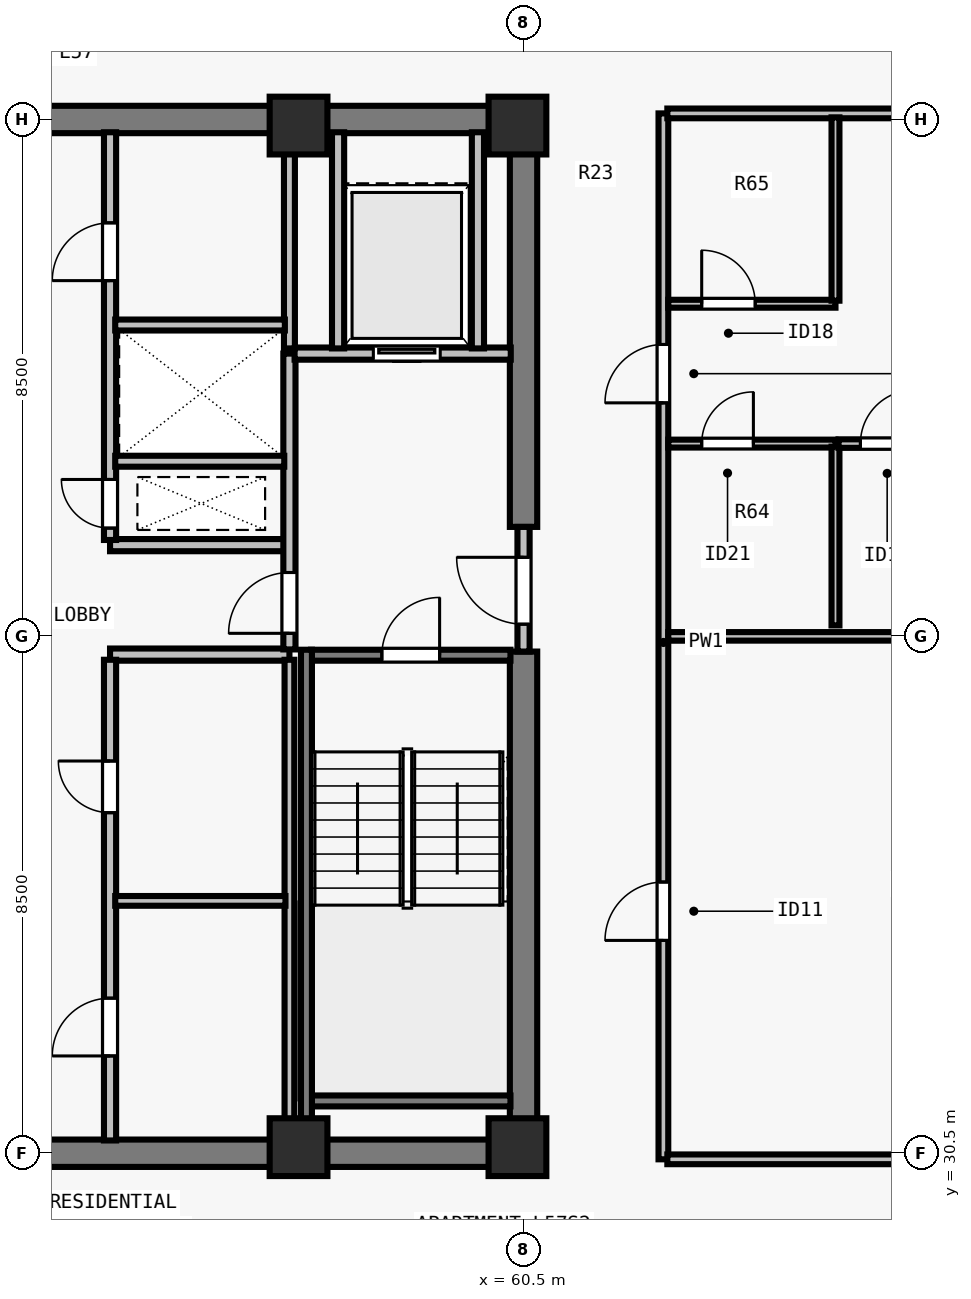
"""IFC4 building model, lengths in metres.
Left out: names, types, materials, properties, quantities, classifications, styles, units other than length and angle.
Written with IfcOpenShell. Run it as: python <this file> out.ifc"""

import sys

from ifc_helpers import new_model, si_unit, direction, frame, frame_2d, origin, origin_2d, place, context, subcontext, project, spatial, rectangle, extrude, element, fill, save


model = new_model("IFC4")
c1 = context("Model", 3, precision=1e-05, world=origin(), true_north=direction((0.0, 1.0)))
c2 = subcontext(c1, "Body", "Model", "MODEL_VIEW")
j1 = project(units=[si_unit("LENGTHUNIT", "METRE"), si_unit("PLANEANGLEUNIT", "RADIAN")], contexts=[c1])
p1 = place(None, origin())
s1 = spatial("IfcSite", under=j1, at=p1, CompositionType="ELEMENT")
p2 = place(p1, origin())
s2 = spatial("IfcBuilding", under=s1, at=p2, CompositionType="ELEMENT")
p3 = place(p2, frame((0.0, 0.0, 209.5)))
s3 = spatial("IfcBuildingStorey", under=s2, at=p3, CompositionType="ELEMENT", Elevation=209.5)
for number, where, z_axis, x_axis in (
    (1, (56.8, 30.6, 0.0), (0.0, 0.0, 1.0), (1.0, 0.0, 0.0)),
    (2, (60.4, 30.6, 0.0), (0.0, 0.0, 1.0), (1.0, 0.0, 0.0)),
    (3, (56.8, 47.4, 0.0), (0.0, 0.0, 1.0), (1.0, 0.0, 0.0)),
    (4, (60.4, 47.4, 0.0), (0.0, 0.0, 1.0), (1.0, 0.0, 0.0)),
):
    element("IfcColumn", number, at=place(p3, frame(where, z_axis=z_axis, x_axis=x_axis)), inside=s3, PredefinedType="COLUMN", context=c2, shape_type="SweptSolid", body=[
        extrude(rectangle(XDim=0.95, YDim=0.95, at=origin_2d()), origin(), (0.0, 0.0, 1.0), 3.5),
    ])
for number, where, z_axis, x_axis in (
    (5, (43.275, 30.5, 0.0), (0.0, 0.0, 1.0), (1.0, 0.0, 0.0)),
    (6, (43.275, 47.5, 0.0), (0.0, 0.0, 1.0), (1.0, 0.0, 0.0)),
):
    element("IfcWall", number, at=place(p3, frame(where, z_axis=z_axis, x_axis=x_axis)), inside=s3, PredefinedType="SHEAR", context=c2, shape_type="SweptSolid", body=[
        extrude(rectangle(XDim=17.45, YDim=0.45, at=frame_2d((8.725, 0.0))), origin(), (0.0, 0.0, 1.0), 3.29),
    ])
p4 = place(p3, frame((60.5, 30.715, 0.0), z_axis=(0.0, 0.0, 1.0), x_axis=(0.0, 1.0, 0.0)))
e7 = element("IfcWall", 7, at=p4, inside=s3, PredefinedType="SHEAR", context=c2, shape_type="SweptSolid", body=[
    extrude(rectangle(XDim=8.035, YDim=0.45, at=frame_2d((4.018, 0.0))), origin(), (0.0, 0.0, 1.0), 3.29),
])
p5 = place(p3, frame((60.5, 40.8, 0.0), z_axis=(0.0, 0.0, 1.0), x_axis=(0.0, 1.0, 0.0)))
e8 = element("IfcWall", 8, at=p5, inside=s3, PredefinedType="SHEAR", context=c2, shape_type="SweptSolid", body=[
    extrude(rectangle(XDim=6.485, YDim=0.45, at=frame_2d((3.242, 0.0))), origin(), (0.0, 0.0, 1.0), 3.29),
])
for number, where, z_axis, x_axis in (
    (9, (53.7, 38.7, 0.0), (0.0, 0.0, 1.0), (1.0, 0.0, 0.0)),
    (10, (53.7, 40.5, 0.0), (0.0, 0.0, 1.0), (1.0, 0.0, 0.0)),
):
    element("IfcWall", number, at=place(p3, frame(where, z_axis=z_axis, x_axis=x_axis)), inside=s3, PredefinedType="SOLIDWALL", context=c2, shape_type="SweptSolid", body=[
        extrude(rectangle(XDim=2.95, YDim=0.2, at=frame_2d((1.475, 0.0))), origin(), (0.0, 0.0, 1.0), 3.29),
    ])
p6 = place(p3, frame((53.7, 30.71, 0.0), z_axis=(0.0, 0.0, 1.0), x_axis=(0.0, 1.0, 0.0)))
e11 = element("IfcWall", 11, at=p6, inside=s3, PredefinedType="SOLIDWALL", context=c2, shape_type="SweptSolid", body=[
    extrude(rectangle(XDim=7.905, YDim=0.2, at=frame_2d((3.953, 0.0))), origin(), (0.0, 0.0, 1.0), 3.29),
])
p7 = place(p6, frame((1.39, 0.0, 0.0)))
e12 = element("IfcOpeningElement", 12, at=p7, cuts=e11, PredefinedType="OPENING", context=c2, shape_type="SweptSolid", body=[
    extrude(rectangle(XDim=0.95, YDim=2.12, at=frame_2d((0.475, 1.06))), frame((0.0, 0.11, 0.0), z_axis=(0.0, -1.0, 0.0), x_axis=(1.0, 0.0, 0.0)), (0.0, 0.0, 1.0), 0.22),
])
p8 = place(p6, frame((5.39, 0.0, 0.0)))
e13 = element("IfcOpeningElement", 13, at=p8, cuts=e11, PredefinedType="OPENING", context=c2, shape_type="SweptSolid", body=[
    extrude(rectangle(XDim=0.85, YDim=2.12, at=frame_2d((0.425, 1.06))), frame((0.0, 0.11, 0.0), z_axis=(0.0, -1.0, 0.0), x_axis=(1.0, 0.0, 0.0)), (0.0, 0.0, 1.0), 0.22),
])
p9 = place(p3, frame((53.7, 40.585, 0.0), z_axis=(0.0, 0.0, 1.0), x_axis=(0.0, 1.0, 0.0)))
e14 = element("IfcWall", 14, at=p9, inside=s3, PredefinedType="SOLIDWALL", context=c2, shape_type="SweptSolid", body=[
    extrude(rectangle(XDim=6.705, YDim=0.2, at=frame_2d((3.353, 0.0))), origin(), (0.0, 0.0, 1.0), 3.29),
])
p10 = place(p9, frame((0.195, 0.0, 0.0)))
e15 = element("IfcOpeningElement", 15, at=p10, cuts=e14, PredefinedType="OPENING", context=c2, shape_type="SweptSolid", body=[
    extrude(rectangle(XDim=0.8, YDim=2.08, at=frame_2d((0.4, 1.04))), frame((0.0, 0.11, 0.0), z_axis=(0.0, -1.0, 0.0), x_axis=(1.0, 0.0, 0.0)), (0.0, 0.0, 1.0), 0.22),
])
p11 = place(p9, frame((4.265, 0.0, 0.0)))
e16 = element("IfcOpeningElement", 16, at=p11, cuts=e14, PredefinedType="OPENING", context=c2, shape_type="SweptSolid", body=[
    extrude(rectangle(XDim=0.95, YDim=2.12, at=frame_2d((0.475, 1.06))), frame((0.0, 0.11, 0.0), z_axis=(0.0, -1.0, 0.0), x_axis=(1.0, 0.0, 0.0)), (0.0, 0.0, 1.0), 0.22),
])
p12 = place(p3, frame((60.5, 38.75, 0.0), z_axis=(0.0, 0.0, 1.0), x_axis=(0.0, 1.0, 0.0)))
e17 = element("IfcWall", 17, at=p12, inside=s3, PredefinedType="SOLIDWALL", context=c2, shape_type="SweptSolid", body=[
    extrude(rectangle(XDim=2.05, YDim=0.2, at=frame_2d((1.025, 0.0))), origin(), (0.0, 0.0, 1.0), 3.29),
])
p13 = place(p12, frame((0.45, 0.0, 0.0)))
e18 = element("IfcOpeningElement", 18, at=p13, cuts=e17, PredefinedType="OPENING", context=c2, shape_type="SweptSolid", body=[
    extrude(rectangle(XDim=1.1, YDim=2.15, at=frame_2d((0.55, 1.075))), frame((0.0, 0.11, 0.0), z_axis=(0.0, -1.0, 0.0), x_axis=(1.0, 0.0, 0.0)), (0.0, 0.0, 1.0), 0.22),
])
p14 = place(p3, frame((56.65, 38.785, 0.0), z_axis=(0.0, 0.0, 1.0), x_axis=(0.0, 1.0, 0.0)))
e19 = element("IfcWall", 19, at=p14, inside=s3, PredefinedType="SOLIDWALL", context=c2, shape_type="SweptSolid", body=[
    extrude(rectangle(XDim=4.865, YDim=0.2, at=frame_2d((2.433, 0.0))), origin(), (0.0, 0.0, 1.0), 3.29),
])
p15 = place(p14, frame((0.265, 0.0, 0.0)))
e20 = element("IfcOpeningElement", 20, at=p15, cuts=e19, PredefinedType="OPENING", context=c2, shape_type="SweptSolid", body=[
    extrude(rectangle(XDim=1.0, YDim=2.15, at=frame_2d((0.5, 1.075))), frame((0.0, 0.11, 0.0), z_axis=(0.0, -1.0, 0.0), x_axis=(1.0, 0.0, 0.0)), (0.0, 0.0, 1.0), 0.22),
])
p16 = place(p3, frame((56.735, 43.65, 0.0), z_axis=(0.0, 0.0, 1.0), x_axis=(1.0, 0.0, 0.0)))
e21 = element("IfcWall", 21, at=p16, inside=s3, PredefinedType="SOLIDWALL", context=c2, shape_type="SweptSolid", body=[
    extrude(rectangle(XDim=3.555, YDim=0.2, at=frame_2d((1.777, 0.0))), origin(), (0.0, 0.0, 1.0), 3.29),
])
p17 = place(p16, frame((1.295, 0.0, 0.0)))
e22 = element("IfcOpeningElement", 22, at=p17, cuts=e21, PredefinedType="OPENING", context=c2, shape_type="SweptSolid", body=[
    extrude(rectangle(XDim=1.1, YDim=2.2, at=frame_2d((0.55, 1.1))), frame((0.0, 0.11, 0.0), z_axis=(0.0, -1.0, 0.0), x_axis=(1.0, 0.0, 0.0)), (0.0, 0.0, 1.0), 0.22),
])
for number, where, z_axis, x_axis in (
    (23, (57.45, 43.735, 0.0), (0.0, 0.0, 1.0), (0.0, 1.0, 0.0)),
    (24, (59.75, 43.735, 0.0), (0.0, 0.0, 1.0), (0.0, 1.0, 0.0)),
):
    element("IfcWall", number, at=place(p3, frame(where, z_axis=z_axis, x_axis=x_axis)), inside=s3, PredefinedType="SOLIDWALL", context=c2, shape_type="SweptSolid", body=[
        extrude(rectangle(XDim=3.555, YDim=0.2, at=frame_2d((1.777, 0.0))), origin(), (0.0, 0.0, 1.0), 3.29),
    ])
p18 = place(p3, frame((56.65, 30.71, 0.0), z_axis=(0.0, 0.0, 1.0), x_axis=(0.0, 1.0, 0.0)))
e25 = element("IfcWall", 25, at=p18, inside=s3, PredefinedType="PARTITIONING", context=c2, shape_type="SweptSolid", body=[
    extrude(rectangle(XDim=7.905, YDim=0.16, at=frame_2d((3.953, 0.0))), origin(), (0.0, 0.0, 1.0), 3.29),
])
p19 = place(p3, frame((53.785, 34.65, 0.0), z_axis=(0.0, 0.0, 1.0), x_axis=(1.0, 0.0, 0.0)))
e26 = element("IfcWall", 26, at=p19, inside=s3, PredefinedType="PARTITIONING", context=c2, shape_type="SweptSolid", body=[
    extrude(rectangle(XDim=2.8, YDim=0.16, at=frame_2d((1.4, 0.0))), origin(), (0.0, 0.0, 1.0), 3.29),
])
p20 = place(p3, frame((56.65, 43.735, 0.0), z_axis=(0.0, 0.0, 1.0), x_axis=(0.0, 1.0, 0.0)))
e27 = element("IfcWall", 27, at=p20, inside=s3, PredefinedType="SOLIDWALL", context=c2, shape_type="SweptSolid", body=[
    extrude(rectangle(XDim=3.555, YDim=0.18, at=frame_2d((1.777, 0.0))), origin(), (0.0, 0.0, 1.0), 3.29),
])
p21 = place(p3, frame((53.785, 41.88, 0.0), z_axis=(0.0, 0.0, 1.0), x_axis=(1.0, 0.0, 0.0)))
e28 = element("IfcWall", 28, at=p21, inside=s3, PredefinedType="SOLIDWALL", context=c2, shape_type="SweptSolid", body=[
    extrude(rectangle(XDim=2.78, YDim=0.18, at=frame_2d((1.39, 0.0))), origin(), (0.0, 0.0, 1.0), 3.29),
])
p22 = place(p3, frame((53.785, 44.12, 0.0), z_axis=(0.0, 0.0, 1.0), x_axis=(1.0, 0.0, 0.0)))
e29 = element("IfcWall", 29, at=p22, inside=s3, PredefinedType="SOLIDWALL", context=c2, shape_type="SweptSolid", body=[
    extrude(rectangle(XDim=2.79, YDim=0.18, at=frame_2d((1.395, 0.0))), origin(), (0.0, 0.0, 1.0), 3.29),
])
p23 = place(p3, frame((62.8, 30.4, 0.0), z_axis=(0.0, 0.0, 1.0), x_axis=(0.0, 1.0, 0.0)))
e30 = element("IfcWall", 30, at=p23, inside=s3, PredefinedType="PARTITIONING", context=c2, shape_type="SweptSolid", body=[
    extrude(rectangle(XDim=17.2, YDim=0.16, at=frame_2d((8.6, 0.0))), origin(), (0.0, 0.0, 1.0), 3.29),
])
p24 = place(p23, frame((3.6, 0.0, 0.0)))
e31 = element("IfcOpeningElement", 31, at=p24, cuts=e30, PredefinedType="OPENING", context=c2, shape_type="SweptSolid", body=[
    extrude(rectangle(XDim=0.96, YDim=2.12, at=frame_2d((0.48, 1.06))), frame((0.0, 0.09, 0.0), z_axis=(0.0, -1.0, 0.0), x_axis=(1.0, 0.0, 0.0)), (0.0, 0.0, 1.0), 0.18),
])
p25 = place(p23, frame((12.44, 0.0, 0.0)))
e32 = element("IfcOpeningElement", 32, at=p25, cuts=e30, PredefinedType="OPENING", context=c2, shape_type="SweptSolid", body=[
    extrude(rectangle(XDim=0.96, YDim=2.18, at=frame_2d((0.48, 1.09))), frame((0.0, 0.09, 0.0), z_axis=(0.0, -1.0, 0.0), x_axis=(1.0, 0.0, 0.0)), (0.0, 0.0, 1.0), 0.18),
])
for number, where, z_axis, x_axis in (
    (33, (62.865, 30.4, 0.0), (0.0, 0.0, 1.0), (1.0, 0.0, 0.0)),
    (34, (62.865, 47.6, 0.0), (0.0, 0.0, 1.0), (1.0, 0.0, 0.0)),
):
    element("IfcWall", number, at=place(p3, frame(where, z_axis=z_axis, x_axis=x_axis)), inside=s3, PredefinedType="PARTITIONING", context=c2, shape_type="SweptSolid", body=[
        extrude(rectangle(XDim=11.33, YDim=0.16, at=frame_2d((5.665, 0.0))), origin(), (0.0, 0.0, 1.0), 3.29),
    ])
p26 = place(p3, frame((62.88, 39.0, 0.0), z_axis=(0.0, 0.0, 1.0), x_axis=(1.0, 0.0, 0.0)))
e35 = element("IfcWall", 35, at=p26, inside=s3, PredefinedType="PARTITIONING", context=c2, shape_type="SweptSolid", body=[
    extrude(rectangle(XDim=11.315, YDim=0.14, at=frame_2d((5.658, 0.0))), origin(), (0.0, 0.0, 1.0), 3.29),
])
p27 = place(p3, frame((62.88, 42.17, 0.0), z_axis=(0.0, 0.0, 1.0), x_axis=(1.0, 0.0, 0.0)))
e36 = element("IfcWall", 36, at=p27, inside=s3, PredefinedType="PLUMBINGWALL", context=c2, shape_type="SweptSolid", body=[
    extrude(rectangle(XDim=2.75, YDim=0.13, at=frame_2d((1.375, 0.0))), origin(), (0.0, 0.0, 1.0), 3.29),
])
p28 = place(p27, frame((0.55, 0.0, 0.0)))
e37 = element("IfcOpeningElement", 37, at=p28, cuts=e36, PredefinedType="OPENING", context=c2, shape_type="SweptSolid", body=[
    extrude(rectangle(XDim=0.85, YDim=2.08, at=frame_2d((0.425, 1.04))), frame((0.0, 0.075, 0.0), z_axis=(0.0, -1.0, 0.0), x_axis=(1.0, 0.0, 0.0)), (0.0, 0.0, 1.0), 0.15),
])
p29 = place(p3, frame((65.63, 39.18, 0.0), z_axis=(0.0, 0.0, 1.0), x_axis=(0.0, 1.0, 0.0)))
e38 = element("IfcWall", 38, at=p29, inside=s3, PredefinedType="PLUMBINGWALL", context=c2, shape_type="SweptSolid", body=[
    extrude(rectangle(XDim=2.94, YDim=0.13, at=frame_2d((1.47, 0.0))), origin(), (0.0, 0.0, 1.0), 3.29),
])
p30 = place(p3, frame((62.88, 44.47, 0.0), z_axis=(0.0, 0.0, 1.0), x_axis=(1.0, 0.0, 0.0)))
e39 = element("IfcWall", 39, at=p30, inside=s3, PredefinedType="PLUMBINGWALL", context=c2, shape_type="SweptSolid", body=[
    extrude(rectangle(XDim=2.75, YDim=0.13, at=frame_2d((1.375, 0.0))), origin(), (0.0, 0.0, 1.0), 3.29),
])
p31 = place(p30, frame((0.55, 0.0, 0.0)))
e40 = element("IfcOpeningElement", 40, at=p31, cuts=e39, PredefinedType="OPENING", context=c2, shape_type="SweptSolid", body=[
    extrude(rectangle(XDim=0.88, YDim=2.1, at=frame_2d((0.44, 1.05))), frame((0.0, 0.075, 0.0), z_axis=(0.0, -1.0, 0.0), x_axis=(1.0, 0.0, 0.0)), (0.0, 0.0, 1.0), 0.15),
])
p32 = place(p3, frame((65.63, 44.52, 0.0), z_axis=(0.0, 0.0, 1.0), x_axis=(0.0, 1.0, 0.0)))
e41 = element("IfcWall", 41, at=p32, inside=s3, PredefinedType="PLUMBINGWALL", context=c2, shape_type="SweptSolid", body=[
    extrude(rectangle(XDim=3.015, YDim=0.13, at=frame_2d((1.507, 0.0))), origin(), (0.0, 0.0, 1.0), 3.29),
])
p33 = place(p3, frame((65.68, 42.17, 0.0), z_axis=(0.0, 0.0, 1.0), x_axis=(1.0, 0.0, 0.0)))
e42 = element("IfcWall", 42, at=p33, inside=s3, PredefinedType="PARTITIONING", context=c2, shape_type="SweptSolid", body=[
    extrude(rectangle(XDim=8.44, YDim=0.14, at=frame_2d((4.22, 0.0))), origin(), (0.0, 0.0, 1.0), 3.29),
])
p34 = place(p33, frame((0.36, 0.0, 0.0)))
e43 = element("IfcOpeningElement", 43, at=p34, cuts=e42, PredefinedType="OPENING", context=c2, shape_type="SweptSolid", body=[
    extrude(rectangle(XDim=0.88, YDim=2.1, at=frame_2d((0.44, 1.05))), frame((0.0, 0.08, 0.0), z_axis=(0.0, -1.0, 0.0), x_axis=(1.0, 0.0, 0.0)), (0.0, 0.0, 1.0), 0.16),
])
p35 = place(p3, frame((57.005, 38.69, 0.0), z_axis=(0.0, 0.0, 1.0), x_axis=(1.0, 0.0, 0.0)))
e44 = element("IfcWall", 44, at=p35, inside=s3, PredefinedType="SOLIDWALL", context=c2, shape_type="SweptSolid", body=[
    extrude(rectangle(XDim=3.28, YDim=0.18, at=frame_2d((1.64, 0.0))), origin(), (0.0, 0.0, 1.0), 3.29),
])
p36 = place(p35, frame((1.165, 0.0, 0.0)))
e45 = element("IfcOpeningElement", 45, at=p36, cuts=e44, PredefinedType="OPENING", context=c2, shape_type="SweptSolid", body=[
    extrude(rectangle(XDim=0.95, YDim=2.15, at=frame_2d((0.475, 1.075))), frame((0.0, 0.1, 0.0), z_axis=(0.0, -1.0, 0.0), x_axis=(1.0, 0.0, 0.0)), (0.0, 0.0, 1.0), 0.2),
])
p37 = place(p3, frame((57.005, 31.36, 0.0), z_axis=(0.0, 0.0, 1.0), x_axis=(1.0, 0.0, 0.0)))
e46 = element("IfcWall", 46, at=p37, inside=s3, PredefinedType="SOLIDWALL", context=c2, shape_type="SweptSolid", body=[
    extrude(rectangle(XDim=3.28, YDim=0.18, at=frame_2d((1.64, 0.0))), origin(), (0.0, 0.0, 1.0), 3.29),
])
p38 = place(p3, frame((56.93, 38.78, 0.0), z_axis=(0.0, 0.0, 1.0), x_axis=(0.0, -1.0, 0.0)))
e47 = element("IfcWall", 47, at=p38, inside=s3, PredefinedType="SOLIDWALL", context=c2, shape_type="SweptSolid", body=[
    extrude(rectangle(XDim=8.067, YDim=0.18, at=frame_2d((4.034, 0.0))), origin(), (0.0, 0.0, 1.0), 3.29),
])
p39 = place(p13, origin())
e48 = element("IfcDoor", 48, at=p39, inside=s3, OperationType="SINGLE_SWING_RIGHT", PredefinedType="DOOR", context=c2, shape_type="SweptSolid", body=[
    extrude(rectangle(XDim=1.1, YDim=2.15, at=frame_2d((0.55, 1.075))), frame((0.0, 0.025, 0.0), z_axis=(0.0, -1.0, 0.0), x_axis=(1.0, 0.0, 0.0)), (0.0, 0.0, 1.0), 0.05),
])
fill(e18, e48)
p40 = place(p15, origin())
e49 = element("IfcDoor", 49, at=p40, inside=s3, OperationType="SINGLE_SWING_LEFT", PredefinedType="DOOR", context=c2, shape_type="SweptSolid", body=[
    extrude(rectangle(XDim=1.0, YDim=2.15, at=frame_2d((0.5, 1.075))), frame((0.0, 0.025, 0.0), z_axis=(0.0, -1.0, 0.0), x_axis=(1.0, 0.0, 0.0)), (0.0, 0.0, 1.0), 0.05),
])
fill(e20, e49)
p41 = place(p17, origin())
e50 = element("IfcDoor", 50, at=p41, inside=s3, OperationType="SLIDING_TO_LEFT", PredefinedType="DOOR", context=c2, shape_type="SweptSolid", body=[
    extrude(rectangle(XDim=1.1, YDim=2.2, at=frame_2d((0.55, 1.1))), frame((0.0, 0.025, 0.0), z_axis=(0.0, -1.0, 0.0), x_axis=(1.0, 0.0, 0.0)), (0.0, 0.0, 1.0), 0.05),
])
fill(e22, e50)
p42 = place(p7, origin())
e51 = element("IfcDoor", 51, at=p42, inside=s3, OperationType="SINGLE_SWING_LEFT", PredefinedType="DOOR", context=c2, shape_type="SweptSolid", body=[
    extrude(rectangle(XDim=0.95, YDim=2.12, at=frame_2d((0.475, 1.06))), frame((0.0, 0.025, 0.0), z_axis=(0.0, -1.0, 0.0), x_axis=(1.0, 0.0, 0.0)), (0.0, 0.0, 1.0), 0.05),
])
fill(e12, e51)
p43 = place(p8, origin())
e52 = element("IfcDoor", 52, at=p43, inside=s3, OperationType="SINGLE_SWING_RIGHT", PredefinedType="DOOR", context=c2, shape_type="SweptSolid", body=[
    extrude(rectangle(XDim=0.85, YDim=2.12, at=frame_2d((0.425, 1.06))), frame((0.0, 0.025, 0.0), z_axis=(0.0, -1.0, 0.0), x_axis=(1.0, 0.0, 0.0)), (0.0, 0.0, 1.0), 0.05),
])
fill(e13, e52)
p44 = place(p10, origin())
e53 = element("IfcDoor", 53, at=p44, inside=s3, OperationType="SINGLE_SWING_RIGHT", PredefinedType="DOOR", context=c2, shape_type="SweptSolid", body=[
    extrude(rectangle(XDim=0.8, YDim=2.08, at=frame_2d((0.4, 1.04))), frame((0.0, 0.025, 0.0), z_axis=(0.0, -1.0, 0.0), x_axis=(1.0, 0.0, 0.0)), (0.0, 0.0, 1.0), 0.05),
])
fill(e15, e53)
p45 = place(p11, origin())
e54 = element("IfcDoor", 54, at=p45, inside=s3, OperationType="SINGLE_SWING_LEFT", PredefinedType="DOOR", context=c2, shape_type="SweptSolid", body=[
    extrude(rectangle(XDim=0.95, YDim=2.12, at=frame_2d((0.475, 1.06))), frame((0.0, 0.025, 0.0), z_axis=(0.0, -1.0, 0.0), x_axis=(1.0, 0.0, 0.0)), (0.0, 0.0, 1.0), 0.05),
])
fill(e16, e54)
p46 = place(p24, origin())
e55 = element("IfcDoor", 55, at=p46, inside=s3, OperationType="SINGLE_SWING_LEFT", PredefinedType="DOOR", context=c2, shape_type="SweptSolid", body=[
    extrude(rectangle(XDim=0.96, YDim=2.12, at=frame_2d((0.48, 1.06))), frame((0.0, 0.025, 0.0), z_axis=(0.0, -1.0, 0.0), x_axis=(1.0, 0.0, 0.0)), (0.0, 0.0, 1.0), 0.05),
])
fill(e31, e55)
p47 = place(p28, origin())
e56 = element("IfcDoor", 56, at=p47, inside=s3, OperationType="SINGLE_SWING_RIGHT", PredefinedType="DOOR", context=c2, shape_type="SweptSolid", body=[
    extrude(rectangle(XDim=0.85, YDim=2.08, at=frame_2d((0.425, 1.04))), frame((0.0, 0.025, 0.0), z_axis=(0.0, -1.0, 0.0), x_axis=(1.0, 0.0, 0.0)), (0.0, 0.0, 1.0), 0.05),
])
fill(e37, e56)
p48 = place(p31, origin())
e57 = element("IfcDoor", 57, at=p48, inside=s3, OperationType="SINGLE_SWING_LEFT", PredefinedType="DOOR", context=c2, shape_type="SweptSolid", body=[
    extrude(rectangle(XDim=0.88, YDim=2.1, at=frame_2d((0.44, 1.05))), frame((0.0, 0.025, 0.0), z_axis=(0.0, -1.0, 0.0), x_axis=(1.0, 0.0, 0.0)), (0.0, 0.0, 1.0), 0.05),
])
fill(e40, e57)
p49 = place(p34, origin())
e58 = element("IfcDoor", 58, at=p49, inside=s3, OperationType="SINGLE_SWING_RIGHT", PredefinedType="DOOR", context=c2, shape_type="SweptSolid", body=[
    extrude(rectangle(XDim=0.88, YDim=2.1, at=frame_2d((0.44, 1.05))), frame((0.0, 0.025, 0.0), z_axis=(0.0, -1.0, 0.0), x_axis=(1.0, 0.0, 0.0)), (0.0, 0.0, 1.0), 0.05),
])
fill(e43, e58)
p50 = place(p25, origin())
e59 = element("IfcDoor", 59, at=p50, inside=s3, OperationType="SINGLE_SWING_LEFT", PredefinedType="DOOR", context=c2, shape_type="SweptSolid", body=[
    extrude(rectangle(XDim=0.96, YDim=2.18, at=frame_2d((0.48, 1.09))), frame((0.0, 0.025, 0.0), z_axis=(0.0, -1.0, 0.0), x_axis=(1.0, 0.0, 0.0)), (0.0, 0.0, 1.0), 0.05),
])
fill(e32, e59)
p51 = place(p36, origin())
e60 = element("IfcDoor", 60, at=p51, inside=s3, OperationType="SINGLE_SWING_RIGHT", PredefinedType="DOOR", context=c2, shape_type="SweptSolid", body=[
    extrude(rectangle(XDim=0.95, YDim=2.15, at=frame_2d((0.475, 1.075))), frame((0.0, 0.025, 0.0), z_axis=(0.0, -1.0, 0.0), x_axis=(1.0, 0.0, 0.0)), (0.0, 0.0, 1.0), 0.05),
])
fill(e45, e60)
save(model, sys.argv[1])
